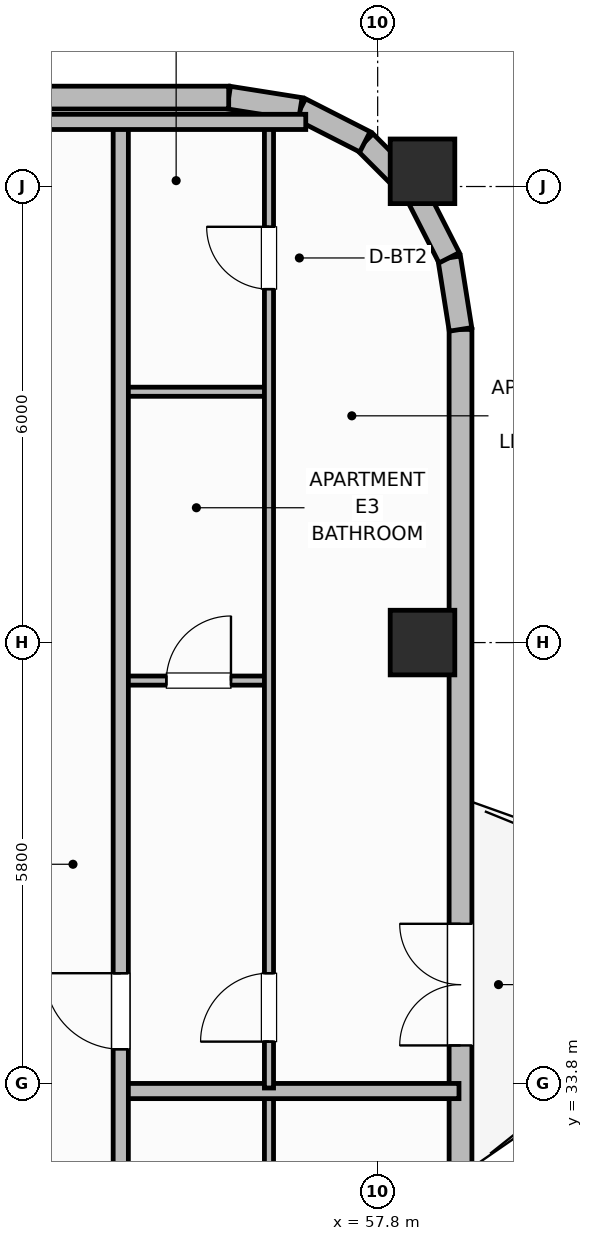
"""IFC4 building model, lengths in metres.
Left out: names, types, materials, properties, quantities, classifications, styles, units other than length and angle.
Written with IfcOpenShell. Run it as: python <this file> out.ifc"""

import sys

from ifc_helpers import new_model, si_unit, direction, frame, frame_2d, origin, origin_2d, place, context, subcontext, project, spatial, rectangle, extrude, element, fill, save


model = new_model("IFC4")
c1 = context("Model", 3, precision=1e-05, world=origin(), true_north=direction((0.0, 1.0)))
c2 = subcontext(c1, "Body", "Model", "MODEL_VIEW")
j1 = project(units=[si_unit("LENGTHUNIT", "METRE"), si_unit("PLANEANGLEUNIT", "RADIAN")], contexts=[c1])
p1 = place(None, origin())
s1 = spatial("IfcSite", under=j1, at=p1, CompositionType="ELEMENT")
p2 = place(p1, origin())
s2 = spatial("IfcBuilding", under=s1, at=p2, CompositionType="ELEMENT")
p3 = place(p2, frame((0.0, 0.0, 233.2)))
s3 = spatial("IfcBuildingStorey", under=s2, at=p3, CompositionType="ELEMENT", Elevation=233.2)
for number, where, z_axis, x_axis in (
    (1, (58.39, 39.6, 0.0), (0.0, 0.0, 1.0), (1.0, 0.0, 0.0)),
    (2, (58.39, 45.8, 0.0), (0.0, 0.0, 1.0), (1.0, 0.0, 0.0)),
):
    element("IfcColumn", number, at=place(p3, frame(where, z_axis=z_axis, x_axis=x_axis)), inside=s3, PredefinedType="COLUMN", context=c2, shape_type="SweptSolid", body=[
        extrude(rectangle(XDim=0.85, YDim=0.85, at=origin_2d()), origin(), (0.0, 0.0, 1.0), 3.7),
    ])
p4 = place(p3, frame((58.89, 32.6, 0.0), z_axis=(0.0, 0.0, 1.0), x_axis=(0.0, 1.0, 0.0)))
e3 = element("IfcWall", 3, at=p4, inside=s3, PredefinedType="SOLIDWALL", context=c2, shape_type="SweptSolid", body=[
    extrude(rectangle(XDim=11.12, YDim=0.3, at=frame_2d((5.56, 0.0))), origin(), (0.0, 0.0, 1.0), 2.73),
])
p5 = place(p4, frame((1.7, 0.0, 0.0)))
e4 = element("IfcOpeningElement", 4, at=p5, cuts=e3, PredefinedType="OPENING", context=c2, shape_type="SweptSolid", body=[
    extrude(rectangle(XDim=1.6, YDim=2.1, at=frame_2d((0.8, 1.05))), frame((0.0, 0.16, 0.0), z_axis=(0.0, -1.0, 0.0), x_axis=(1.0, 0.0, 0.0)), (0.0, 0.0, 1.0), 0.32),
])
p6 = place(p3, frame((58.89, 43.72, 0.0), z_axis=(0.0, 0.0, 1.0), x_axis=(-0.156304114255, 0.987708977314, 0.0)))
e5 = element("IfcWall", 5, at=p6, inside=s3, PredefinedType="SOLIDWALL", context=c2, shape_type="SweptSolid", body=[
    extrude(rectangle(XDim=0.954, YDim=0.3, at=frame_2d((0.477, 0.0))), origin(), (0.0, 0.0, 1.0), 2.73),
])
p7 = place(p3, frame((58.741, 44.663, 0.0), z_axis=(0.0, 0.0, 1.0), x_axis=(-0.45395644796, 0.891023873617, 0.0)))
e6 = element("IfcWall", 6, at=p7, inside=s3, PredefinedType="SOLIDWALL", context=c2, shape_type="SweptSolid", body=[
    extrude(rectangle(XDim=0.954, YDim=0.3, at=frame_2d((0.477, 0.0))), origin(), (0.0, 0.0, 1.0), 2.73),
])
for number, where, z_axis, x_axis in (
    (7, (58.308, 45.513, 0.0), (0.0, 0.0, 1.0), (-0.707, 0.707, 0.0)),
    (8, (57.633, 46.188, 0.0), (0.0, 0.0, 1.0), (-0.891, 0.454, 0.0)),
):
    element("IfcWall", number, at=place(p3, frame(where, z_axis=z_axis, x_axis=x_axis)), inside=s3, PredefinedType="SOLIDWALL", context=c2, shape_type="SweptSolid", body=[
        extrude(rectangle(XDim=0.954, YDim=0.3, at=frame_2d((0.477, 0.0))), origin(), (0.0, 0.0, 1.0), 2.73),
    ])
p8 = place(p3, frame((56.782, 46.621, 0.0), z_axis=(0.0, 0.0, 1.0), x_axis=(-0.987663181641, 0.156593229835, 0.0)))
e9 = element("IfcWall", 9, at=p8, inside=s3, PredefinedType="SOLIDWALL", context=c2, shape_type="SweptSolid", body=[
    extrude(rectangle(XDim=0.954, YDim=0.3, at=frame_2d((0.477, 0.0))), origin(), (0.0, 0.0, 1.0), 2.73),
])
p9 = place(p3, frame((55.84, 46.77, 0.0), z_axis=(0.0, 0.0, 1.0), x_axis=(-1.0, 0.0, 0.0)))
e10 = element("IfcWall", 10, at=p9, inside=s3, PredefinedType="SOLIDWALL", context=c2, shape_type="SweptSolid", body=[
    extrude(rectangle(XDim=33.28, YDim=0.3, at=frame_2d((16.64, 0.0))), origin(), (0.0, 0.0, 1.0), 2.73),
])
p10 = place(p9, frame((4.647, 0.0, 0.71)))
e11 = element("IfcOpeningElement", 11, at=p10, cuts=e10, PredefinedType="OPENING", context=c2, shape_type="SweptSolid", body=[
    extrude(rectangle(XDim=1.6, YDim=1.9, at=frame_2d((0.8, 0.95))), frame((0.0, 0.16, 0.0), z_axis=(0.0, -1.0, 0.0), x_axis=(1.0, 0.0, 0.0)), (0.0, 0.0, 1.0), 0.32),
])
p11 = place(p9, frame((7.845, 0.0, 0.71)))
e12 = element("IfcOpeningElement", 12, at=p11, cuts=e10, PredefinedType="OPENING", context=c2, shape_type="SweptSolid", body=[
    extrude(rectangle(XDim=1.6, YDim=1.9, at=frame_2d((0.8, 0.95))), frame((0.0, 0.16, 0.0), z_axis=(0.0, -1.0, 0.0), x_axis=(1.0, 0.0, 0.0)), (0.0, 0.0, 1.0), 0.32),
])
p12 = place(p9, frame((14.241, 0.0, 0.71)))
e13 = element("IfcOpeningElement", 13, at=p12, cuts=e10, PredefinedType="OPENING", context=c2, shape_type="SweptSolid", body=[
    extrude(rectangle(XDim=1.6, YDim=1.9, at=frame_2d((0.8, 0.95))), frame((0.0, 0.16, 0.0), z_axis=(0.0, -1.0, 0.0), x_axis=(1.0, 0.0, 0.0)), (0.0, 0.0, 1.0), 0.32),
])
p13 = place(p9, frame((17.439, 0.0, 0.71)))
e14 = element("IfcOpeningElement", 14, at=p13, cuts=e10, PredefinedType="OPENING", context=c2, shape_type="SweptSolid", body=[
    extrude(rectangle(XDim=1.6, YDim=1.9, at=frame_2d((0.8, 0.95))), frame((0.0, 0.16, 0.0), z_axis=(0.0, -1.0, 0.0), x_axis=(1.0, 0.0, 0.0)), (0.0, 0.0, 1.0), 0.32),
])
p14 = place(p9, frame((23.835, 0.0, 0.71)))
e15 = element("IfcOpeningElement", 15, at=p14, cuts=e10, PredefinedType="OPENING", context=c2, shape_type="SweptSolid", body=[
    extrude(rectangle(XDim=1.6, YDim=1.9, at=frame_2d((0.8, 0.95))), frame((0.0, 0.16, 0.0), z_axis=(0.0, -1.0, 0.0), x_axis=(1.0, 0.0, 0.0)), (0.0, 0.0, 1.0), 0.32),
])
p15 = place(p9, frame((27.033, 0.0, 0.71)))
e16 = element("IfcOpeningElement", 16, at=p15, cuts=e10, PredefinedType="OPENING", context=c2, shape_type="SweptSolid", body=[
    extrude(rectangle(XDim=1.6, YDim=1.9, at=frame_2d((0.8, 0.95))), frame((0.0, 0.16, 0.0), z_axis=(0.0, -1.0, 0.0), x_axis=(1.0, 0.0, 0.0)), (0.0, 0.0, 1.0), 0.32),
])
p16 = place(p3, frame((56.37, 22.4, 0.0), z_axis=(0.0, 0.0, 1.0), x_axis=(0.0, 1.0, 0.0)))
e17 = element("IfcWall", 17, at=p16, inside=s3, PredefinedType="PARTITIONING", context=c2, shape_type="SweptSolid", body=[
    extrude(rectangle(XDim=11.26, YDim=0.12, at=frame_2d((5.63, 0.0))), origin(), (0.0, 0.0, 1.0), 2.56),
])
p17 = place(p16, frame((0.61, 0.0, 0.0)))
e18 = element("IfcOpeningElement", 18, at=p17, cuts=e17, PredefinedType="OPENING", context=c2, shape_type="SweptSolid", body=[
    extrude(rectangle(XDim=0.9, YDim=2.1, at=frame_2d((0.45, 1.05))), frame((0.0, 0.07, 0.0), z_axis=(0.0, -1.0, 0.0), x_axis=(1.0, 0.0, 0.0)), (0.0, 0.0, 1.0), 0.14),
])
p18 = place(p3, frame((54.42, 33.7, 0.0), z_axis=(0.0, 0.0, 1.0), x_axis=(1.0, 0.0, 0.0)))
e19 = element("IfcWall", 19, at=p18, inside=s3, PredefinedType="PARTITIONING", context=c2, shape_type="SweptSolid", body=[
    extrude(rectangle(XDim=4.45, YDim=0.2, at=frame_2d((2.225, 0.0))), origin(), (0.0, 0.0, 1.0), 2.56),
])
p19 = place(p3, frame((54.42, 39.1, 0.0), z_axis=(0.0, 0.0, 1.0), x_axis=(1.0, 0.0, 0.0)))
e20 = element("IfcWall", 20, at=p19, inside=s3, PredefinedType="PARTITIONING", context=c2, shape_type="SweptSolid", body=[
    extrude(rectangle(XDim=1.95, YDim=0.12, at=frame_2d((0.975, 0.0))), origin(), (0.0, 0.0, 1.0), 2.56),
])
p20 = place(p19, frame((0.6, 0.0, 0.0)))
e21 = element("IfcOpeningElement", 21, at=p20, cuts=e20, PredefinedType="OPENING", context=c2, shape_type="SweptSolid", body=[
    extrude(rectangle(XDim=0.85, YDim=2.1, at=frame_2d((0.425, 1.05))), frame((0.0, 0.07, 0.0), z_axis=(0.0, -1.0, 0.0), x_axis=(1.0, 0.0, 0.0)), (0.0, 0.0, 1.0), 0.14),
])
p21 = place(p3, frame((54.42, 42.9, 0.0), z_axis=(0.0, 0.0, 1.0), x_axis=(1.0, 0.0, 0.0)))
e22 = element("IfcWall", 22, at=p21, inside=s3, PredefinedType="PARTITIONING", context=c2, shape_type="SweptSolid", body=[
    extrude(rectangle(XDim=1.95, YDim=0.12, at=frame_2d((0.975, 0.0))), origin(), (0.0, 0.0, 1.0), 2.56),
])
p22 = place(p3, frame((56.37, 33.74, 0.0), z_axis=(0.0, 0.0, 1.0), x_axis=(0.0, 1.0, 0.0)))
e23 = element("IfcWall", 23, at=p22, inside=s3, PredefinedType="PARTITIONING", context=c2, shape_type="SweptSolid", body=[
    extrude(rectangle(XDim=12.67, YDim=0.12, at=frame_2d((6.335, 0.0))), origin(), (0.0, 0.0, 1.0), 2.56),
])
p23 = place(p22, frame((0.61, 0.0, 0.0)))
e24 = element("IfcOpeningElement", 24, at=p23, cuts=e23, PredefinedType="OPENING", context=c2, shape_type="SweptSolid", body=[
    extrude(rectangle(XDim=0.9, YDim=2.1, at=frame_2d((0.45, 1.05))), frame((0.0, 0.07, 0.0), z_axis=(0.0, -1.0, 0.0), x_axis=(1.0, 0.0, 0.0)), (0.0, 0.0, 1.0), 0.14),
])
p24 = place(p22, frame((10.51, 0.0, 0.0)))
e25 = element("IfcOpeningElement", 25, at=p24, cuts=e23, PredefinedType="OPENING", context=c2, shape_type="SweptSolid", body=[
    extrude(rectangle(XDim=0.82, YDim=2.08, at=frame_2d((0.41, 1.04))), frame((0.0, 0.07, 0.0), z_axis=(0.0, -1.0, 0.0), x_axis=(1.0, 0.0, 0.0)), (0.0, 0.0, 1.0), 0.14),
])
p25 = place(p3, frame((54.42, 9.95, 0.0), z_axis=(0.0, 0.0, 1.0), x_axis=(0.0, 1.0, 0.0)))
e26 = element("IfcWall", 26, at=p25, inside=s3, PredefinedType="PARTITIONING", context=c2, shape_type="SweptSolid", body=[
    extrude(rectangle(XDim=36.5, YDim=0.2, at=frame_2d((18.25, 0.0))), origin(), (0.0, 0.0, 1.0), 2.56),
])
p26 = place(p25, frame((3.25, 0.0, 0.0)))
e27 = element("IfcOpeningElement", 27, at=p26, cuts=e26, PredefinedType="OPENING", context=c2, shape_type="SweptSolid", body=[
    extrude(rectangle(XDim=1.0, YDim=2.15, at=frame_2d((0.5, 1.075))), frame((0.0, 0.11, 0.0), z_axis=(0.0, -1.0, 0.0), x_axis=(1.0, 0.0, 0.0)), (0.0, 0.0, 1.0), 0.22),
])
p27 = place(p25, frame((12.96, 0.0, 0.0)))
e28 = element("IfcOpeningElement", 28, at=p27, cuts=e26, PredefinedType="OPENING", context=c2, shape_type="SweptSolid", body=[
    extrude(rectangle(XDim=1.0, YDim=2.15, at=frame_2d((0.5, 1.075))), frame((0.0, 0.11, 0.0), z_axis=(0.0, -1.0, 0.0), x_axis=(1.0, 0.0, 0.0)), (0.0, 0.0, 1.0), 0.22),
])
p28 = place(p25, frame((24.3, 0.0, 0.0)))
e29 = element("IfcOpeningElement", 29, at=p28, cuts=e26, PredefinedType="OPENING", context=c2, shape_type="SweptSolid", body=[
    extrude(rectangle(XDim=1.0, YDim=2.15, at=frame_2d((0.5, 1.075))), frame((0.0, 0.11, 0.0), z_axis=(0.0, -1.0, 0.0), x_axis=(1.0, 0.0, 0.0)), (0.0, 0.0, 1.0), 0.22),
])
p29 = place(p3, frame((53.1, 46.45, 0.0), z_axis=(0.0, 0.0, 1.0), x_axis=(1.0, 0.0, 0.0)))
e30 = element("IfcWall", 30, at=p29, inside=s3, PredefinedType="PARTITIONING", context=c2, shape_type="SweptSolid", body=[
    extrude(rectangle(XDim=3.754, YDim=0.2, at=frame_2d((1.877, 0.0))), origin(), (0.0, 0.0, 1.0), 2.56),
])
p30 = place(p5, origin())
e31 = element("IfcDoor", 31, at=p30, inside=s3, OperationType="DOUBLE_DOOR_SINGLE_SWING", PredefinedType="DOOR", context=c2, shape_type="SweptSolid", body=[
    extrude(rectangle(XDim=1.6, YDim=2.1, at=frame_2d((0.8, 1.05))), frame((0.0, 0.025, 0.0), z_axis=(0.0, -1.0, 0.0), x_axis=(1.0, 0.0, 0.0)), (0.0, 0.0, 1.0), 0.05),
])
fill(e4, e31)
p31 = place(p20, origin())
e32 = element("IfcDoor", 32, at=p31, inside=s3, OperationType="SINGLE_SWING_RIGHT", PredefinedType="DOOR", context=c2, shape_type="SweptSolid", body=[
    extrude(rectangle(XDim=0.85, YDim=2.1, at=frame_2d((0.425, 1.05))), frame((0.0, 0.025, 0.0), z_axis=(0.0, -1.0, 0.0), x_axis=(1.0, 0.0, 0.0)), (0.0, 0.0, 1.0), 0.05),
])
fill(e21, e32)
p32 = place(p23, origin())
e33 = element("IfcDoor", 33, at=p32, inside=s3, OperationType="SINGLE_SWING_LEFT", PredefinedType="DOOR", context=c2, shape_type="SweptSolid", body=[
    extrude(rectangle(XDim=0.9, YDim=2.1, at=frame_2d((0.45, 1.05))), frame((0.0, 0.025, 0.0), z_axis=(0.0, -1.0, 0.0), x_axis=(1.0, 0.0, 0.0)), (0.0, 0.0, 1.0), 0.05),
])
fill(e24, e33)
p33 = place(p24, origin())
e34 = element("IfcDoor", 34, at=p33, inside=s3, OperationType="SINGLE_SWING_RIGHT", PredefinedType="DOOR", context=c2, shape_type="SweptSolid", body=[
    extrude(rectangle(XDim=0.82, YDim=2.08, at=frame_2d((0.41, 1.04))), frame((0.0, 0.025, 0.0), z_axis=(0.0, -1.0, 0.0), x_axis=(1.0, 0.0, 0.0)), (0.0, 0.0, 1.0), 0.05),
])
fill(e25, e34)
p34 = place(p28, origin())
e35 = element("IfcDoor", 35, at=p34, inside=s3, OperationType="SINGLE_SWING_RIGHT", PredefinedType="DOOR", context=c2, shape_type="SweptSolid", body=[
    extrude(rectangle(XDim=1.0, YDim=2.15, at=frame_2d((0.5, 1.075))), frame((0.0, 0.025, 0.0), z_axis=(0.0, -1.0, 0.0), x_axis=(1.0, 0.0, 0.0)), (0.0, 0.0, 1.0), 0.05),
])
fill(e29, e35)
save(model, sys.argv[1])
